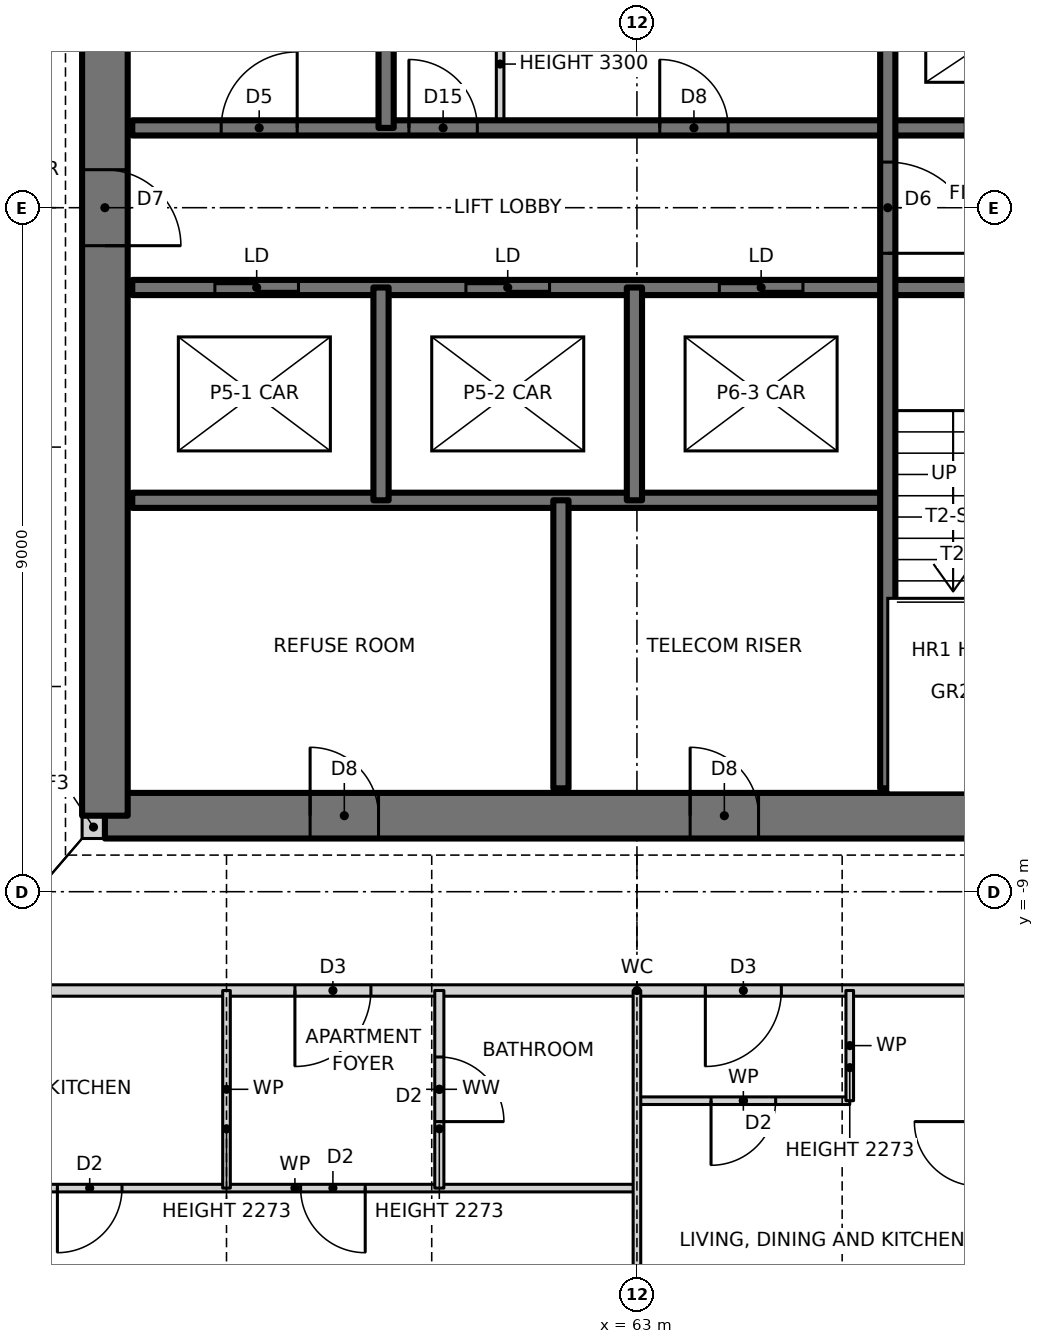
"""IFC4 building model, lengths in metres.
Left out: names, types, materials, properties, quantities, classifications, styles, units other than length and angle.
Written with IfcOpenShell. Run it as: python <this file> out.ifc"""

import sys

from ifc_helpers import new_model, si_unit, direction, frame, frame_2d, origin, place, context, subcontext, project, spatial, rectangle, extrude, element, fill, save


model = new_model("IFC4")
c1 = context("Model", 3, precision=1e-05, world=origin(), true_north=direction((0.0, 1.0)))
c2 = subcontext(c1, "Body", "Model", "MODEL_VIEW")
j1 = project(units=[si_unit("LENGTHUNIT", "METRE"), si_unit("PLANEANGLEUNIT", "RADIAN")], contexts=[c1])
p1 = place(None, origin())
s1 = spatial("IfcSite", under=j1, at=p1, CompositionType="ELEMENT")
p2 = place(p1, origin())
s2 = spatial("IfcBuilding", under=s1, at=p2, CompositionType="ELEMENT")
p3 = place(p2, frame((0.0, 0.0, 71.0)))
s3 = spatial("IfcBuildingStorey", under=s2, at=p3, CompositionType="ELEMENT", Elevation=71.0)
p4 = place(p3, frame((55.7, -8.15, 0.0), z_axis=(0.0, 0.0, 1.0), x_axis=(1.0, 0.0, 0.0)))
e1 = element("IfcWall", 1, at=p4, inside=s3, PredefinedType="SOLIDWALL", context=c2, shape_type="SweptSolid", body=[
    extrude(rectangle(XDim=0.3, YDim=0.3, at=frame_2d((0.15, 0.0))), origin(), (0.0, 0.0, 1.0), 3.5),
])
p5 = place(p3, frame((56.0, -8.0, 0.0), z_axis=(0.0, 0.0, 1.0), x_axis=(1.0, 0.0, 0.0)))
e2 = element("IfcWall", 2, at=p5, inside=s3, PredefinedType="SHEAR", context=c2, shape_type="SweptSolid", body=[
    extrude(rectangle(XDim=14.0, YDim=0.6, at=frame_2d((7.0, 0.0))), origin(), (0.0, 0.0, 1.0), 3.5),
])
p6 = place(p5, frame((2.7, 0.0, 0.0)))
e3 = element("IfcOpeningElement", 3, at=p6, cuts=e2, PredefinedType="OPENING", context=c2, shape_type="SweptSolid", body=[
    extrude(rectangle(XDim=0.9, YDim=2.1, at=frame_2d((0.45, 1.05))), frame((0.0, 0.31, 0.0), z_axis=(0.0, -1.0, 0.0), x_axis=(1.0, 0.0, 0.0)), (0.0, 0.0, 1.0), 0.62),
])
p7 = place(p5, frame((7.7, 0.0, 0.0)))
e4 = element("IfcOpeningElement", 4, at=p7, cuts=e2, PredefinedType="OPENING", context=c2, shape_type="SweptSolid", body=[
    extrude(rectangle(XDim=0.9, YDim=2.1, at=frame_2d((0.45, 1.05))), frame((0.0, 0.31, 0.0), z_axis=(0.0, -1.0, 0.0), x_axis=(1.0, 0.0, 0.0)), (0.0, 0.0, 1.0), 0.62),
])
p8 = place(p3, frame((56.0, 8.0, 0.0), z_axis=(0.0, 0.0, 1.0), x_axis=(0.0, -1.0, 0.0)))
e5 = element("IfcWall", 5, at=p8, inside=s3, PredefinedType="SHEAR", context=c2, shape_type="SweptSolid", body=[
    extrude(rectangle(XDim=16.0, YDim=0.6, at=frame_2d((8.0, 0.0))), origin(), (0.0, 0.0, 1.0), 3.5),
])
p9 = place(p8, frame((7.5, 0.0, 0.0)))
e6 = element("IfcOpeningElement", 6, at=p9, cuts=e5, PredefinedType="OPENING", context=c2, shape_type="SweptSolid", body=[
    extrude(rectangle(XDim=1.0, YDim=2.1, at=frame_2d((0.5, 1.05))), frame((0.0, 0.31, 0.0), z_axis=(0.0, -1.0, 0.0), x_axis=(1.0, 0.0, 0.0)), (0.0, 0.0, 1.0), 0.62),
])
p10 = place(p3, frame((54.0, -12.9, 0.0), z_axis=(0.0, 0.0, 1.0), x_axis=(1.0, 0.0, 0.0)))
e7 = element("IfcWall", 7, at=p10, inside=s3, PredefinedType="PARTITIONING", context=c2, shape_type="SweptSolid", body=[
    extrude(rectangle(XDim=9.0, YDim=0.1, at=frame_2d((4.5, 0.0))), origin(), (0.0, 0.0, 1.0), 3.2),
])
p11 = place(p10, frame((1.375, 0.0, 0.0)))
e8 = element("IfcOpeningElement", 8, at=p11, cuts=e7, PredefinedType="OPENING", context=c2, shape_type="SweptSolid", body=[
    extrude(rectangle(XDim=0.85, YDim=2.1, at=frame_2d((0.425, 1.05))), frame((0.0, 0.06, 0.0), z_axis=(0.0, -1.0, 0.0), x_axis=(1.0, 0.0, 0.0)), (0.0, 0.0, 1.0), 0.12),
])
p12 = place(p10, frame((4.575, 0.0, 0.0)))
e9 = element("IfcOpeningElement", 9, at=p12, cuts=e7, PredefinedType="OPENING", context=c2, shape_type="SweptSolid", body=[
    extrude(rectangle(XDim=0.85, YDim=2.1, at=frame_2d((0.425, 1.05))), frame((0.0, 0.06, 0.0), z_axis=(0.0, -1.0, 0.0), x_axis=(1.0, 0.0, 0.0)), (0.0, 0.0, 1.0), 0.12),
])
p13 = place(p3, frame((63.0, -11.75, 0.0), z_axis=(0.0, 0.0, 1.0), x_axis=(1.0, 0.0, 0.0)))
e10 = element("IfcWall", 10, at=p13, inside=s3, PredefinedType="PARTITIONING", context=c2, shape_type="SweptSolid", body=[
    extrude(rectangle(XDim=2.8, YDim=0.1, at=frame_2d((1.4, 0.0))), origin(), (0.0, 0.0, 1.0), 3.2),
])
p14 = place(p13, frame((0.975, 0.0, 0.0)))
e11 = element("IfcOpeningElement", 11, at=p14, cuts=e10, PredefinedType="OPENING", context=c2, shape_type="SweptSolid", body=[
    extrude(rectangle(XDim=0.85, YDim=2.1, at=frame_2d((0.425, 1.05))), frame((0.0, 0.06, 0.0), z_axis=(0.0, -1.0, 0.0), x_axis=(1.0, 0.0, 0.0)), (0.0, 0.0, 1.0), 0.12),
])
p15 = place(p3, frame((53.7, -10.3, 0.0), z_axis=(0.0, 0.0, 1.0), x_axis=(1.0, 0.0, 0.0)))
e12 = element("IfcWall", 12, at=p15, inside=s3, PredefinedType="PARTITIONING", context=c2, shape_type="SweptSolid", body=[
    extrude(rectangle(XDim=18.6, YDim=0.15, at=frame_2d((9.3, 0.0))), origin(), (0.0, 0.0, 1.0), 3.2),
])
p16 = place(p15, frame((4.8, 0.0, 0.0)))
e13 = element("IfcOpeningElement", 13, at=p16, cuts=e12, PredefinedType="OPENING", context=c2, shape_type="SweptSolid", body=[
    extrude(rectangle(XDim=1.0, YDim=2.1, at=frame_2d((0.5, 1.05))), frame((0.0, 0.085, 0.0), z_axis=(0.0, -1.0, 0.0), x_axis=(1.0, 0.0, 0.0)), (0.0, 0.0, 1.0), 0.17),
])
p17 = place(p15, frame((10.2, 0.0, 0.0)))
e14 = element("IfcOpeningElement", 14, at=p17, cuts=e12, PredefinedType="OPENING", context=c2, shape_type="SweptSolid", body=[
    extrude(rectangle(XDim=1.0, YDim=2.1, at=frame_2d((0.5, 1.05))), frame((0.0, 0.085, 0.0), z_axis=(0.0, -1.0, 0.0), x_axis=(1.0, 0.0, 0.0)), (0.0, 0.0, 1.0), 0.17),
])
p18 = place(p3, frame((56.36, -3.85, 0.0), z_axis=(0.0, 0.0, 1.0), x_axis=(1.0, 0.0, 0.0)))
e15 = element("IfcWall", 15, at=p18, inside=s3, PredefinedType="SOLIDWALL", context=c2, shape_type="SweptSolid", body=[
    extrude(rectangle(XDim=9.94, YDim=0.2, at=frame_2d((4.97, 0.0))), origin(), (0.0, 0.0, 1.0), 3.5),
])
p19 = place(p3, frame((56.36, -1.05, 0.0), z_axis=(0.0, 0.0, 1.0), x_axis=(1.0, 0.0, 0.0)))
e16 = element("IfcWall", 16, at=p19, inside=s3, PredefinedType="SOLIDWALL", context=c2, shape_type="SweptSolid", body=[
    extrude(rectangle(XDim=13.28, YDim=0.2, at=frame_2d((6.64, 0.0))), origin(), (0.0, 0.0, 1.0), 3.5),
])
p20 = place(p19, frame((11.11, 0.0, 0.0)))
e17 = element("IfcOpeningElement", 17, at=p20, cuts=e16, PredefinedType="OPENING", context=c2, shape_type="SweptSolid", body=[
    extrude(rectangle(XDim=1.0, YDim=2.1, at=frame_2d((0.5, 1.05))), frame((0.0, 0.11, 0.0), z_axis=(0.0, -1.0, 0.0), x_axis=(1.0, 0.0, 0.0)), (0.0, 0.0, 1.0), 0.22),
])
p21 = place(p19, frame((1.087, 0.0, 0.0)))
e18 = element("IfcOpeningElement", 18, at=p21, cuts=e16, PredefinedType="OPENING", context=c2, shape_type="SweptSolid", body=[
    extrude(rectangle(XDim=1.1, YDim=2.1, at=frame_2d((0.55, 1.05))), frame((0.0, 0.11, 0.0), z_axis=(0.0, -1.0, 0.0), x_axis=(1.0, 0.0, 0.0)), (0.0, 0.0, 1.0), 0.22),
])
p22 = place(p19, frame((4.39, 0.0, 0.0)))
e19 = element("IfcOpeningElement", 19, at=p22, cuts=e16, PredefinedType="OPENING", context=c2, shape_type="SweptSolid", body=[
    extrude(rectangle(XDim=1.1, YDim=2.1, at=frame_2d((0.55, 1.05))), frame((0.0, 0.11, 0.0), z_axis=(0.0, -1.0, 0.0), x_axis=(1.0, 0.0, 0.0)), (0.0, 0.0, 1.0), 0.22),
])
p23 = place(p19, frame((7.724, 0.0, 0.0)))
e20 = element("IfcOpeningElement", 20, at=p23, cuts=e16, PredefinedType="OPENING", context=c2, shape_type="SweptSolid", body=[
    extrude(rectangle(XDim=1.1, YDim=2.1, at=frame_2d((0.55, 1.05))), frame((0.0, 0.11, 0.0), z_axis=(0.0, -1.0, 0.0), x_axis=(1.0, 0.0, 0.0)), (0.0, 0.0, 1.0), 0.22),
])
p24 = place(p3, frame((56.36, 1.05, 0.0), z_axis=(0.0, 0.0, 1.0), x_axis=(1.0, 0.0, 0.0)))
e21 = element("IfcWall", 21, at=p24, inside=s3, PredefinedType="SOLIDWALL", context=c2, shape_type="SweptSolid", body=[
    extrude(rectangle(XDim=13.28, YDim=0.2, at=frame_2d((6.64, 0.0))), origin(), (0.0, 0.0, 1.0), 3.5),
])
p25 = place(p24, frame((1.17, 0.0, 0.0)))
e22 = element("IfcOpeningElement", 22, at=p25, cuts=e21, PredefinedType="OPENING", context=c2, shape_type="SweptSolid", body=[
    extrude(rectangle(XDim=1.0, YDim=2.1, at=frame_2d((0.5, 1.05))), frame((0.0, 0.11, 0.0), z_axis=(0.0, -1.0, 0.0), x_axis=(1.0, 0.0, 0.0)), (0.0, 0.0, 1.0), 0.22),
])
p26 = place(p24, frame((6.94, 0.0, 0.0)))
e23 = element("IfcOpeningElement", 23, at=p26, cuts=e21, PredefinedType="OPENING", context=c2, shape_type="SweptSolid", body=[
    extrude(rectangle(XDim=0.9, YDim=2.1, at=frame_2d((0.45, 1.05))), frame((0.0, 0.11, 0.0), z_axis=(0.0, -1.0, 0.0), x_axis=(1.0, 0.0, 0.0)), (0.0, 0.0, 1.0), 0.22),
])
p27 = place(p24, frame((3.64, 0.0, 0.0)))
e24 = element("IfcOpeningElement", 24, at=p27, cuts=e21, PredefinedType="OPENING", context=c2, shape_type="SweptSolid", body=[
    extrude(rectangle(XDim=0.9, YDim=2.1, at=frame_2d((0.45, 1.05))), frame((0.0, 0.11, 0.0), z_axis=(0.0, -1.0, 0.0), x_axis=(1.0, 0.0, 0.0)), (0.0, 0.0, 1.0), 0.22),
])
p28 = place(p24, frame((10.96, 0.0, 0.0)))
e25 = element("IfcOpeningElement", 25, at=p28, cuts=e21, PredefinedType="OPENING", context=c2, shape_type="SweptSolid", body=[
    extrude(rectangle(XDim=1.3, YDim=2.1, at=frame_2d((0.65, 1.05))), frame((0.0, 0.11, 0.0), z_axis=(0.0, -1.0, 0.0), x_axis=(1.0, 0.0, 0.0)), (0.0, 0.0, 1.0), 0.22),
])
p29 = place(p3, frame((66.3, -7.64, 0.0), z_axis=(0.0, 0.0, 1.0), x_axis=(0.0, 1.0, 0.0)))
e26 = element("IfcWall", 26, at=p29, inside=s3, PredefinedType="SOLIDWALL", context=c2, shape_type="SweptSolid", body=[
    extrude(rectangle(XDim=11.49, YDim=0.2, at=frame_2d((5.745, 0.0))), origin(), (0.0, 0.0, 1.0), 3.5),
])
p30 = place(p29, frame((7.04, 0.0, 0.0)))
e27 = element("IfcOpeningElement", 27, at=p30, cuts=e26, PredefinedType="OPENING", context=c2, shape_type="SweptSolid", body=[
    extrude(rectangle(XDim=1.2, YDim=2.1, at=frame_2d((0.6, 1.05))), frame((0.0, 0.11, 0.0), z_axis=(0.0, -1.0, 0.0), x_axis=(1.0, 0.0, 0.0)), (0.0, 0.0, 1.0), 0.22),
])
p31 = place(p3, frame((65.8, -11.75, 0.0), z_axis=(0.0, 0.0, 1.0), x_axis=(0.0, 1.0, 0.0)))
e28 = element("IfcWall", 28, at=p31, inside=s3, PredefinedType="PARTITIONING", context=c2, shape_type="SweptSolid", body=[
    extrude(rectangle(XDim=1.45, YDim=0.1, at=frame_2d((0.725, 0.0))), origin(), (0.0, 0.0, 1.0), 2.273),
])
p32 = place(p3, frame((63.0, -18.69, 0.0), z_axis=(0.0, 0.0, 1.0), x_axis=(0.0, 1.0, 0.0)))
e29 = element("IfcWall", 29, at=p32, inside=s3, PredefinedType="PARTITIONING", context=c2, shape_type="SweptSolid", body=[
    extrude(rectangle(XDim=8.39, YDim=0.1, at=frame_2d((4.195, 0.0))), origin(), (0.0, 0.0, 1.0), 2.273),
])
p33 = place(p3, frame((62.967, -3.85, 0.0), z_axis=(0.0, 0.0, 1.0), x_axis=(0.0, 1.0, 0.0)))
e30 = element("IfcWall", 30, at=p33, inside=s3, PredefinedType="SOLIDWALL", context=c2, shape_type="SweptSolid", body=[
    extrude(rectangle(XDim=2.8, YDim=0.2, at=frame_2d((1.4, 0.0))), origin(), (0.0, 0.0, 1.0), 3.5),
])
p34 = place(p3, frame((62.0, -7.64, 0.0), z_axis=(0.0, 0.0, 1.0), x_axis=(0.0, 1.0, 0.0)))
e31 = element("IfcWall", 31, at=p34, inside=s3, PredefinedType="SOLIDWALL", context=c2, shape_type="SweptSolid", body=[
    extrude(rectangle(XDim=3.79, YDim=0.2, at=frame_2d((1.895, 0.0))), origin(), (0.0, 0.0, 1.0), 3.5),
])
p35 = place(p3, frame((61.2, 1.05, 0.0), z_axis=(0.0, 0.0, 1.0), x_axis=(0.0, 1.0, 0.0)))
e32 = element("IfcWall", 32, at=p35, inside=s3, PredefinedType="PARTITIONING", context=c2, shape_type="SweptSolid", body=[
    extrude(rectangle(XDim=2.8, YDim=0.1, at=frame_2d((1.4, 0.0))), origin(), (0.0, 0.0, 1.0), 3.3),
])
p36 = place(p3, frame((60.4, -12.9, 0.0), z_axis=(0.0, 0.0, 1.0), x_axis=(0.0, 1.0, 0.0)))
e33 = element("IfcWall", 33, at=p36, inside=s3, PredefinedType="PARTITIONING", context=c2, shape_type="SweptSolid", body=[
    extrude(rectangle(XDim=2.6, YDim=0.12, at=frame_2d((1.3, 0.0))), origin(), (0.0, 0.0, 1.0), 2.273),
])
p37 = place(p36, frame((0.875, 0.0, 0.0)))
e34 = element("IfcOpeningElement", 34, at=p37, cuts=e33, PredefinedType="OPENING", context=c2, shape_type="SweptSolid", body=[
    extrude(rectangle(XDim=0.85, YDim=2.1, at=frame_2d((0.425, 1.05))), frame((0.0, 0.07, 0.0), z_axis=(0.0, -1.0, 0.0), x_axis=(1.0, 0.0, 0.0)), (0.0, 0.0, 1.0), 0.14),
])
p38 = place(p3, frame((59.7, 1.05, 0.0), z_axis=(0.0, 0.0, 1.0), x_axis=(0.0, 1.0, 0.0)))
e35 = element("IfcWall", 35, at=p38, inside=s3, PredefinedType="SOLIDWALL", context=c2, shape_type="SweptSolid", body=[
    extrude(rectangle(XDim=6.59, YDim=0.2, at=frame_2d((3.295, 0.0))), origin(), (0.0, 0.0, 1.0), 3.5),
])
p39 = place(p3, frame((59.633, -3.85, 0.0), z_axis=(0.0, 0.0, 1.0), x_axis=(0.0, 1.0, 0.0)))
e36 = element("IfcWall", 36, at=p39, inside=s3, PredefinedType="SOLIDWALL", context=c2, shape_type="SweptSolid", body=[
    extrude(rectangle(XDim=2.8, YDim=0.2, at=frame_2d((1.4, 0.0))), origin(), (0.0, 0.0, 1.0), 3.5),
])
p40 = place(p3, frame((57.6, -12.9, 0.0), z_axis=(0.0, 0.0, 1.0), x_axis=(0.0, 1.0, 0.0)))
e37 = element("IfcWall", 37, at=p40, inside=s3, PredefinedType="PARTITIONING", context=c2, shape_type="SweptSolid", body=[
    extrude(rectangle(XDim=2.6, YDim=0.1, at=frame_2d((1.3, 0.0))), origin(), (0.0, 0.0, 1.0), 2.273),
])
p41 = place(p25, origin())
e38 = element("IfcDoor", 38, at=p41, inside=s3, OperationType="SINGLE_SWING_RIGHT", PredefinedType="DOOR", context=c2, shape_type="SweptSolid", body=[
    extrude(rectangle(XDim=1.0, YDim=2.1, at=frame_2d((0.5, 1.05))), frame((0.0, 0.025, 0.0), z_axis=(0.0, -1.0, 0.0), x_axis=(1.0, 0.0, 0.0)), (0.0, 0.0, 1.0), 0.05),
])
fill(e22, e38)
p42 = place(p30, frame((1.2, 0.0, 0.0), z_axis=(0.0, 0.0, 1.0), x_axis=(-1.0, 0.0, 0.0)))
e39 = element("IfcDoor", 39, at=p42, inside=s3, OperationType="SINGLE_SWING_RIGHT", PredefinedType="DOOR", context=c2, shape_type="SweptSolid", body=[
    extrude(rectangle(XDim=1.2, YDim=2.1, at=frame_2d((0.6, 1.05))), frame((0.0, 0.025, 0.0), z_axis=(0.0, -1.0, 0.0), x_axis=(1.0, 0.0, 0.0)), (0.0, 0.0, 1.0), 0.05),
])
fill(e27, e39)
p43 = place(p26, origin())
e40 = element("IfcDoor", 40, at=p43, inside=s3, OperationType="SINGLE_SWING_LEFT", PredefinedType="DOOR", context=c2, shape_type="SweptSolid", body=[
    extrude(rectangle(XDim=0.9, YDim=2.1, at=frame_2d((0.45, 1.05))), frame((0.0, 0.025, 0.0), z_axis=(0.0, -1.0, 0.0), x_axis=(1.0, 0.0, 0.0)), (0.0, 0.0, 1.0), 0.05),
])
fill(e23, e40)
p44 = place(p27, origin())
e41 = element("IfcDoor", 41, at=p44, inside=s3, OperationType="SINGLE_SWING_LEFT", PredefinedType="DOOR", context=c2, shape_type="SweptSolid", body=[
    extrude(rectangle(XDim=0.9, YDim=2.1, at=frame_2d((0.45, 1.05))), frame((0.0, 0.025, 0.0), z_axis=(0.0, -1.0, 0.0), x_axis=(1.0, 0.0, 0.0)), (0.0, 0.0, 1.0), 0.05),
])
fill(e24, e41)
p45 = place(p11, frame((0.85, 0.0, 0.0), z_axis=(0.0, 0.0, 1.0), x_axis=(-1.0, 0.0, 0.0)))
e42 = element("IfcDoor", 42, at=p45, inside=s3, OperationType="SINGLE_SWING_RIGHT", PredefinedType="DOOR", context=c2, shape_type="SweptSolid", body=[
    extrude(rectangle(XDim=0.85, YDim=2.1, at=frame_2d((0.425, 1.05))), frame((0.0, 0.025, 0.0), z_axis=(0.0, -1.0, 0.0), x_axis=(1.0, 0.0, 0.0)), (0.0, 0.0, 1.0), 0.05),
])
fill(e8, e42)
p46 = place(p16, frame((1.0, 0.0, 0.0), z_axis=(0.0, 0.0, 1.0), x_axis=(-1.0, 0.0, 0.0)))
e43 = element("IfcDoor", 43, at=p46, inside=s3, OperationType="SINGLE_SWING_RIGHT", PredefinedType="DOOR", context=c2, shape_type="SweptSolid", body=[
    extrude(rectangle(XDim=1.0, YDim=2.1, at=frame_2d((0.5, 1.05))), frame((0.0, 0.025, 0.0), z_axis=(0.0, -1.0, 0.0), x_axis=(1.0, 0.0, 0.0)), (0.0, 0.0, 1.0), 0.05),
])
fill(e13, e43)
p47 = place(p12, frame((0.85, 0.0, 0.0), z_axis=(0.0, 0.0, 1.0), x_axis=(-1.0, 0.0, 0.0)))
e44 = element("IfcDoor", 44, at=p47, inside=s3, OperationType="SINGLE_SWING_LEFT", PredefinedType="DOOR", context=c2, shape_type="SweptSolid", body=[
    extrude(rectangle(XDim=0.85, YDim=2.1, at=frame_2d((0.425, 1.05))), frame((0.0, 0.025, 0.0), z_axis=(0.0, -1.0, 0.0), x_axis=(1.0, 0.0, 0.0)), (0.0, 0.0, 1.0), 0.05),
])
fill(e9, e44)
p48 = place(p37, frame((0.85, 0.0, 0.0), z_axis=(0.0, 0.0, 1.0), x_axis=(-1.0, 0.0, 0.0)))
e45 = element("IfcDoor", 45, at=p48, inside=s3, OperationType="SINGLE_SWING_RIGHT", PredefinedType="DOOR", context=c2, shape_type="SweptSolid", body=[
    extrude(rectangle(XDim=0.85, YDim=2.1, at=frame_2d((0.425, 1.05))), frame((0.0, 0.025, 0.0), z_axis=(0.0, -1.0, 0.0), x_axis=(1.0, 0.0, 0.0)), (0.0, 0.0, 1.0), 0.05),
])
fill(e34, e45)
p49 = place(p17, frame((1.0, 0.0, 0.0), z_axis=(0.0, 0.0, 1.0), x_axis=(-1.0, 0.0, 0.0)))
e46 = element("IfcDoor", 46, at=p49, inside=s3, OperationType="SINGLE_SWING_RIGHT", PredefinedType="DOOR", context=c2, shape_type="SweptSolid", body=[
    extrude(rectangle(XDim=1.0, YDim=2.1, at=frame_2d((0.5, 1.05))), frame((0.0, 0.025, 0.0), z_axis=(0.0, -1.0, 0.0), x_axis=(1.0, 0.0, 0.0)), (0.0, 0.0, 1.0), 0.05),
])
fill(e14, e46)
p50 = place(p14, frame((0.85, 0.0, 0.0), z_axis=(0.0, 0.0, 1.0), x_axis=(-1.0, 0.0, 0.0)))
e47 = element("IfcDoor", 47, at=p50, inside=s3, OperationType="SINGLE_SWING_RIGHT", PredefinedType="DOOR", context=c2, shape_type="SweptSolid", body=[
    extrude(rectangle(XDim=0.85, YDim=2.1, at=frame_2d((0.425, 1.05))), frame((0.0, 0.025, 0.0), z_axis=(0.0, -1.0, 0.0), x_axis=(1.0, 0.0, 0.0)), (0.0, 0.0, 1.0), 0.05),
])
fill(e11, e47)
p51 = place(p9, origin())
e48 = element("IfcDoor", 48, at=p51, inside=s3, OperationType="SINGLE_SWING_RIGHT", PredefinedType="DOOR", context=c2, shape_type="SweptSolid", body=[
    extrude(rectangle(XDim=1.0, YDim=2.1, at=frame_2d((0.5, 1.05))), frame((0.0, 0.025, 0.0), z_axis=(0.0, -1.0, 0.0), x_axis=(1.0, 0.0, 0.0)), (0.0, 0.0, 1.0), 0.05),
])
fill(e6, e48)
p52 = place(p6, origin())
e49 = element("IfcDoor", 49, at=p52, inside=s3, OperationType="SINGLE_SWING_LEFT", PredefinedType="DOOR", context=c2, shape_type="SweptSolid", body=[
    extrude(rectangle(XDim=0.9, YDim=2.1, at=frame_2d((0.45, 1.05))), frame((0.0, 0.025, 0.0), z_axis=(0.0, -1.0, 0.0), x_axis=(1.0, 0.0, 0.0)), (0.0, 0.0, 1.0), 0.05),
])
fill(e3, e49)
p53 = place(p7, origin())
e50 = element("IfcDoor", 50, at=p53, inside=s3, OperationType="SINGLE_SWING_LEFT", PredefinedType="DOOR", context=c2, shape_type="SweptSolid", body=[
    extrude(rectangle(XDim=0.9, YDim=2.1, at=frame_2d((0.45, 1.05))), frame((0.0, 0.025, 0.0), z_axis=(0.0, -1.0, 0.0), x_axis=(1.0, 0.0, 0.0)), (0.0, 0.0, 1.0), 0.05),
])
fill(e4, e50)
p54 = place(p21, origin())
e51 = element("IfcDoor", 51, at=p54, inside=s3, OperationType="DOUBLE_DOOR_SLIDING", PredefinedType="DOOR", context=c2, shape_type="SweptSolid", body=[
    extrude(rectangle(XDim=1.1, YDim=2.1, at=frame_2d((0.55, 1.05))), frame((0.0, 0.025, 0.0), z_axis=(0.0, -1.0, 0.0), x_axis=(1.0, 0.0, 0.0)), (0.0, 0.0, 1.0), 0.05),
])
fill(e18, e51)
p55 = place(p22, origin())
e52 = element("IfcDoor", 52, at=p55, inside=s3, OperationType="DOUBLE_DOOR_SLIDING", PredefinedType="DOOR", context=c2, shape_type="SweptSolid", body=[
    extrude(rectangle(XDim=1.1, YDim=2.1, at=frame_2d((0.55, 1.05))), frame((0.0, 0.025, 0.0), z_axis=(0.0, -1.0, 0.0), x_axis=(1.0, 0.0, 0.0)), (0.0, 0.0, 1.0), 0.05),
])
fill(e19, e52)
p56 = place(p23, origin())
e53 = element("IfcDoor", 53, at=p56, inside=s3, OperationType="DOUBLE_DOOR_SLIDING", PredefinedType="DOOR", context=c2, shape_type="SweptSolid", body=[
    extrude(rectangle(XDim=1.1, YDim=2.1, at=frame_2d((0.55, 1.05))), frame((0.0, 0.025, 0.0), z_axis=(0.0, -1.0, 0.0), x_axis=(1.0, 0.0, 0.0)), (0.0, 0.0, 1.0), 0.05),
])
fill(e20, e53)
save(model, sys.argv[1])
